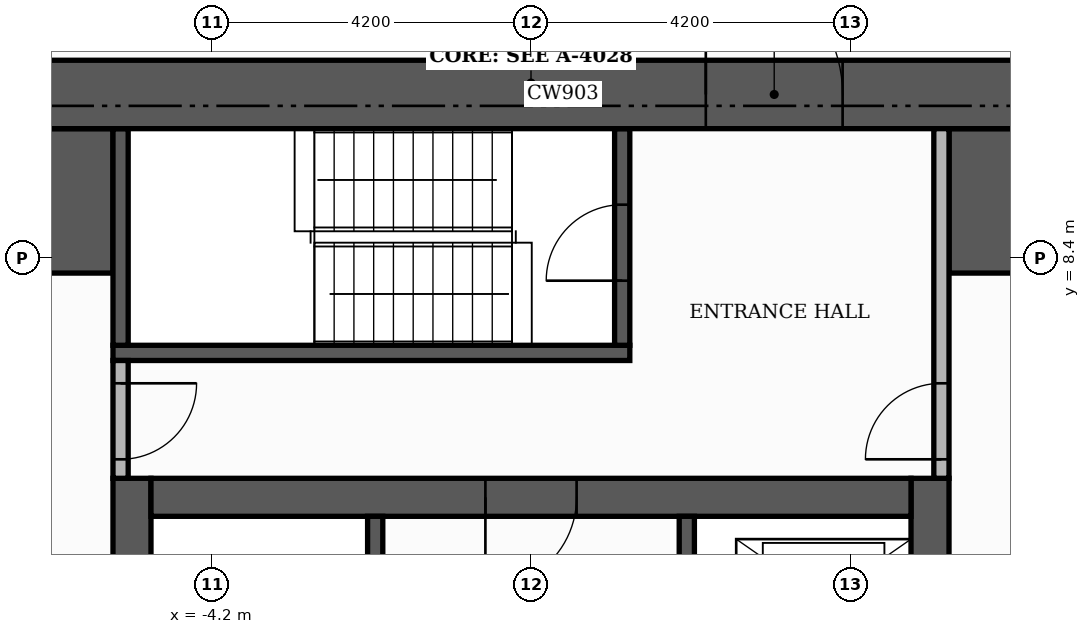
"""IFC4 building model, lengths in metres.
Left out: names, types, materials, properties, quantities, classifications, styles, units other than length and angle.
Written with IfcOpenShell. Run it as: python <this file> out.ifc"""

import sys

from ifc_helpers import new_model, si_unit, direction, frame, frame_2d, origin, place, context, subcontext, project, spatial, rectangle, extrude, element, fill, save


model = new_model("IFC4")
c1 = context("Model", 3, precision=1e-05, world=origin(), true_north=direction((0.0, 1.0)))
c2 = subcontext(c1, "Body", "Model", "MODEL_VIEW")
j1 = project(units=[si_unit("LENGTHUNIT", "METRE"), si_unit("PLANEANGLEUNIT", "RADIAN")], contexts=[c1])
p1 = place(None, origin())
s1 = spatial("IfcSite", under=j1, at=p1, CompositionType="ELEMENT")
p2 = place(p1, origin())
s2 = spatial("IfcBuilding", under=s1, at=p2, CompositionType="ELEMENT")
p3 = place(p2, frame((0.0, 0.0, 168.9)))
s3 = spatial("IfcBuildingStorey", under=s2, at=p3, CompositionType="ELEMENT", Elevation=168.9)
for number, where, z_axis, x_axis in (
    (1, (-5.25, -5.0, 0.0), (0.0, 0.0, 1.0), (0.0, 1.0, 0.0)),
    (2, (5.25, -5.0, 0.0), (0.0, 0.0, 1.0), (0.0, 1.0, 0.0)),
):
    element("IfcWall", number, at=place(p3, frame(where, z_axis=z_axis, x_axis=x_axis)), inside=s3, PredefinedType="SHEAR", context=c2, shape_type="SweptSolid", body=[
        extrude(rectangle(XDim=10.5, YDim=0.5, at=frame_2d((5.25, 0.0))), origin(), (0.0, 0.0, 1.0), 3.48),
    ])
p4 = place(p3, frame((-5.0, 5.25, 0.0), z_axis=(0.0, 0.0, 1.0), x_axis=(1.0, 0.0, 0.0)))
e3 = element("IfcWall", 3, at=p4, inside=s3, PredefinedType="SHEAR", context=c2, shape_type="SweptSolid", body=[
    extrude(rectangle(XDim=10.0, YDim=0.5, at=frame_2d((5.0, 0.0))), origin(), (0.0, 0.0, 1.0), 3.48),
])
p5 = place(p4, frame((4.4, 0.0, 0.0)))
e4 = element("IfcOpeningElement", 4, at=p5, cuts=e3, PredefinedType="OPENING", context=c2, shape_type="SweptSolid", body=[
    extrude(rectangle(XDim=1.2, YDim=2.1, at=frame_2d((0.6, 1.05))), frame((0.0, 0.26, 0.0), z_axis=(0.0, -1.0, 0.0), x_axis=(1.0, 0.0, 0.0)), (0.0, 0.0, 1.0), 0.52),
])
for number, where, z_axis, x_axis in (
    (5, (-10.1, 9.15, 0.0), (0.0, 0.0, 1.0), (1.0, 0.0, 0.0)),
    (6, (5.5, 9.15, 0.0), (0.0, 0.0, 1.0), (1.0, 0.0, 0.0)),
):
    element("IfcWall", number, at=place(p3, frame(where, z_axis=z_axis, x_axis=x_axis)), inside=s3, PredefinedType="SHEAR", context=c2, shape_type="SweptSolid", body=[
        extrude(rectangle(XDim=4.6, YDim=1.9, at=frame_2d((2.3, 0.0))), origin(), (0.0, 0.0, 1.0), 3.48),
    ])
p6 = place(p3, frame((-2.05, -1.4, 0.0), z_axis=(0.0, 0.0, 1.0), x_axis=(0.0, 1.0, 0.0)))
e7 = element("IfcWall", 7, at=p6, inside=s3, PredefinedType="SHEAR", context=c2, shape_type="SweptSolid", body=[
    extrude(rectangle(XDim=6.4, YDim=0.2, at=frame_2d((3.2, 0.0))), origin(), (0.0, 0.0, 1.0), 3.48),
])
p7 = place(p6, frame((0.15, 0.0, 0.0)))
e8 = element("IfcOpeningElement", 8, at=p7, cuts=e7, PredefinedType="OPENING", context=c2, shape_type="SweptSolid", body=[
    extrude(rectangle(XDim=1.0, YDim=2.1, at=frame_2d((0.5, 1.05))), frame((0.0, 0.11, 0.0), z_axis=(0.0, -1.0, 0.0), x_axis=(1.0, 0.0, 0.0)), (0.0, 0.0, 1.0), 0.22),
])
p8 = place(p3, frame((-5.5, 7.15, 0.0), z_axis=(0.0, 0.0, 1.0), x_axis=(1.0, 0.0, 0.0)))
e9 = element("IfcWall", 9, at=p8, inside=s3, PredefinedType="SHEAR", context=c2, shape_type="SweptSolid", body=[
    extrude(rectangle(XDim=6.8, YDim=0.2, at=frame_2d((3.4, 0.0))), origin(), (0.0, 0.0, 1.0), 3.48),
])
p9 = place(p3, frame((-5.4, 7.25, 0.0), z_axis=(0.0, 0.0, 1.0), x_axis=(0.0, 1.0, 0.0)))
e10 = element("IfcWall", 10, at=p9, inside=s3, PredefinedType="SHEAR", context=c2, shape_type="SweptSolid", body=[
    extrude(rectangle(XDim=2.85, YDim=0.2, at=frame_2d((1.425, 0.0))), origin(), (0.0, 0.0, 1.0), 3.48),
])
p10 = place(p3, frame((1.2, 7.25, 0.0), z_axis=(0.0, 0.0, 1.0), x_axis=(0.0, 1.0, 0.0)))
e11 = element("IfcWall", 11, at=p10, inside=s3, PredefinedType="SHEAR", context=c2, shape_type="SweptSolid", body=[
    extrude(rectangle(XDim=2.85, YDim=0.2, at=frame_2d((1.425, 0.0))), origin(), (0.0, 0.0, 1.0), 3.48),
])
p11 = place(p10, frame((0.85, 0.0, 0.0)))
e12 = element("IfcOpeningElement", 12, at=p11, cuts=e11, PredefinedType="OPENING", context=c2, shape_type="SweptSolid", body=[
    extrude(rectangle(XDim=1.0, YDim=2.1, at=frame_2d((0.5, 1.05))), frame((0.0, 0.11, 0.0), z_axis=(0.0, -1.0, 0.0), x_axis=(1.0, 0.0, 0.0)), (0.0, 0.0, 1.0), 0.22),
])
p12 = place(p3, frame((2.05, 1.6, 0.0), z_axis=(0.0, 0.0, 1.0), x_axis=(0.0, 1.0, 0.0)))
e13 = element("IfcWall", 13, at=p12, inside=s3, PredefinedType="SHEAR", context=c2, shape_type="SweptSolid", body=[
    extrude(rectangle(XDim=3.4, YDim=0.2, at=frame_2d((1.7, 0.0))), origin(), (0.0, 0.0, 1.0), 3.48),
])
p13 = place(p12, frame((1.75, 0.0, 0.0)))
e14 = element("IfcOpeningElement", 14, at=p13, cuts=e13, PredefinedType="OPENING", context=c2, shape_type="SweptSolid", body=[
    extrude(rectangle(XDim=1.1, YDim=2.1, at=frame_2d((0.55, 1.05))), frame((0.0, 0.11, 0.0), z_axis=(0.0, -1.0, 0.0), x_axis=(1.0, 0.0, 0.0)), (0.0, 0.0, 1.0), 0.22),
])
p14 = place(p12, frame((0.15, 0.0, 0.0)))
e15 = element("IfcOpeningElement", 15, at=p14, cuts=e13, PredefinedType="OPENING", context=c2, shape_type="SweptSolid", body=[
    extrude(rectangle(XDim=0.8, YDim=2.1, at=frame_2d((0.4, 1.05))), frame((0.0, 0.11, 0.0), z_axis=(0.0, -1.0, 0.0), x_axis=(1.0, 0.0, 0.0)), (0.0, 0.0, 1.0), 0.22),
])
p15 = place(p3, frame((-11.0, 10.55, 0.0), z_axis=(0.0, 0.0, 1.0), x_axis=(1.0, 0.0, 0.0)))
e16 = element("IfcWall", 16, at=p15, inside=s3, PredefinedType="SHEAR", context=c2, shape_type="SweptSolid", body=[
    extrude(rectangle(XDim=22.0, YDim=0.9, at=frame_2d((11.0, 0.0))), origin(), (0.0, 0.0, 1.0), 3.48),
])
p16 = place(p15, frame((13.3, 0.0, 0.0)))
e17 = element("IfcOpeningElement", 17, at=p16, cuts=e16, PredefinedType="OPENING", context=c2, shape_type="SweptSolid", body=[
    extrude(rectangle(XDim=1.8, YDim=2.2, at=frame_2d((0.9, 1.1))), frame((0.0, 0.46, 0.0), z_axis=(0.0, -1.0, 0.0), x_axis=(1.0, 0.0, 0.0)), (0.0, 0.0, 1.0), 0.92),
])
p17 = place(p3, frame((-5.4, 5.5, 0.0), z_axis=(0.0, 0.0, 1.0), x_axis=(0.0, 1.0, 0.0)))
e18 = element("IfcWall", 18, at=p17, inside=s3, PredefinedType="PARTITIONING", context=c2, shape_type="SweptSolid", body=[
    extrude(rectangle(XDim=1.55, YDim=0.2, at=frame_2d((0.775, 0.0))), origin(), (0.0, 0.0, 1.0), 3.48),
])
p18 = place(p17, frame((0.25, 0.0, 0.0)))
e19 = element("IfcOpeningElement", 19, at=p18, cuts=e18, PredefinedType="OPENING", context=c2, shape_type="SweptSolid", body=[
    extrude(rectangle(XDim=1.0, YDim=2.1, at=frame_2d((0.5, 1.05))), frame((0.0, 0.11, 0.0), z_axis=(0.0, -1.0, 0.0), x_axis=(1.0, 0.0, 0.0)), (0.0, 0.0, 1.0), 0.22),
])
p19 = place(p3, frame((5.4, 5.5, 0.0), z_axis=(0.0, 0.0, 1.0), x_axis=(0.0, 1.0, 0.0)))
e20 = element("IfcWall", 20, at=p19, inside=s3, PredefinedType="PARTITIONING", context=c2, shape_type="SweptSolid", body=[
    extrude(rectangle(XDim=4.6, YDim=0.2, at=frame_2d((2.3, 0.0))), origin(), (0.0, 0.0, 1.0), 3.48),
])
p20 = place(p19, frame((0.25, 0.0, 0.0)))
e21 = element("IfcOpeningElement", 21, at=p20, cuts=e20, PredefinedType="OPENING", context=c2, shape_type="SweptSolid", body=[
    extrude(rectangle(XDim=1.0, YDim=2.1, at=frame_2d((0.5, 1.05))), frame((0.0, 0.11, 0.0), z_axis=(0.0, -1.0, 0.0), x_axis=(1.0, 0.0, 0.0)), (0.0, 0.0, 1.0), 0.22),
])
p21 = place(p5, frame((1.2, 0.0, 0.0), z_axis=(0.0, 0.0, 1.0), x_axis=(-1.0, 0.0, 0.0)))
e22 = element("IfcDoor", 22, at=p21, inside=s3, OperationType="SINGLE_SWING_LEFT", PredefinedType="DOOR", context=c2, shape_type="SweptSolid", body=[
    extrude(rectangle(XDim=1.2, YDim=2.1, at=frame_2d((0.6, 1.05))), frame((0.0, 0.025, 0.0), z_axis=(0.0, -1.0, 0.0), x_axis=(1.0, 0.0, 0.0)), (0.0, 0.0, 1.0), 0.05),
])
fill(e4, e22)
p22 = place(p11, origin())
e23 = element("IfcDoor", 23, at=p22, inside=s3, OperationType="SINGLE_SWING_LEFT", PredefinedType="DOOR", context=c2, shape_type="SweptSolid", body=[
    extrude(rectangle(XDim=1.0, YDim=2.1, at=frame_2d((0.5, 1.05))), frame((0.0, 0.025, 0.0), z_axis=(0.0, -1.0, 0.0), x_axis=(1.0, 0.0, 0.0)), (0.0, 0.0, 1.0), 0.05),
])
fill(e12, e23)
p23 = place(p18, frame((1.0, 0.0, 0.0), z_axis=(0.0, 0.0, 1.0), x_axis=(-1.0, 0.0, 0.0)))
e24 = element("IfcDoor", 24, at=p23, inside=s3, OperationType="SINGLE_SWING_RIGHT", PredefinedType="DOOR", context=c2, shape_type="SweptSolid", body=[
    extrude(rectangle(XDim=1.0, YDim=2.1, at=frame_2d((0.5, 1.05))), frame((0.0, 0.025, 0.0), z_axis=(0.0, -1.0, 0.0), x_axis=(1.0, 0.0, 0.0)), (0.0, 0.0, 1.0), 0.05),
])
fill(e19, e24)
p24 = place(p20, origin())
e25 = element("IfcDoor", 25, at=p24, inside=s3, OperationType="SINGLE_SWING_LEFT", PredefinedType="DOOR", context=c2, shape_type="SweptSolid", body=[
    extrude(rectangle(XDim=1.0, YDim=2.1, at=frame_2d((0.5, 1.05))), frame((0.0, 0.025, 0.0), z_axis=(0.0, -1.0, 0.0), x_axis=(1.0, 0.0, 0.0)), (0.0, 0.0, 1.0), 0.05),
])
fill(e21, e25)
p25 = place(p16, origin())
e26 = element("IfcDoor", 26, at=p25, inside=s3, OperationType="DOUBLE_DOOR_SINGLE_SWING", PredefinedType="DOOR", context=c2, shape_type="SweptSolid", body=[
    extrude(rectangle(XDim=1.8, YDim=2.2, at=frame_2d((0.9, 1.1))), frame((0.0, 0.025, 0.0), z_axis=(0.0, -1.0, 0.0), x_axis=(1.0, 0.0, 0.0)), (0.0, 0.0, 1.0), 0.05),
])
fill(e17, e26)
save(model, sys.argv[1])
